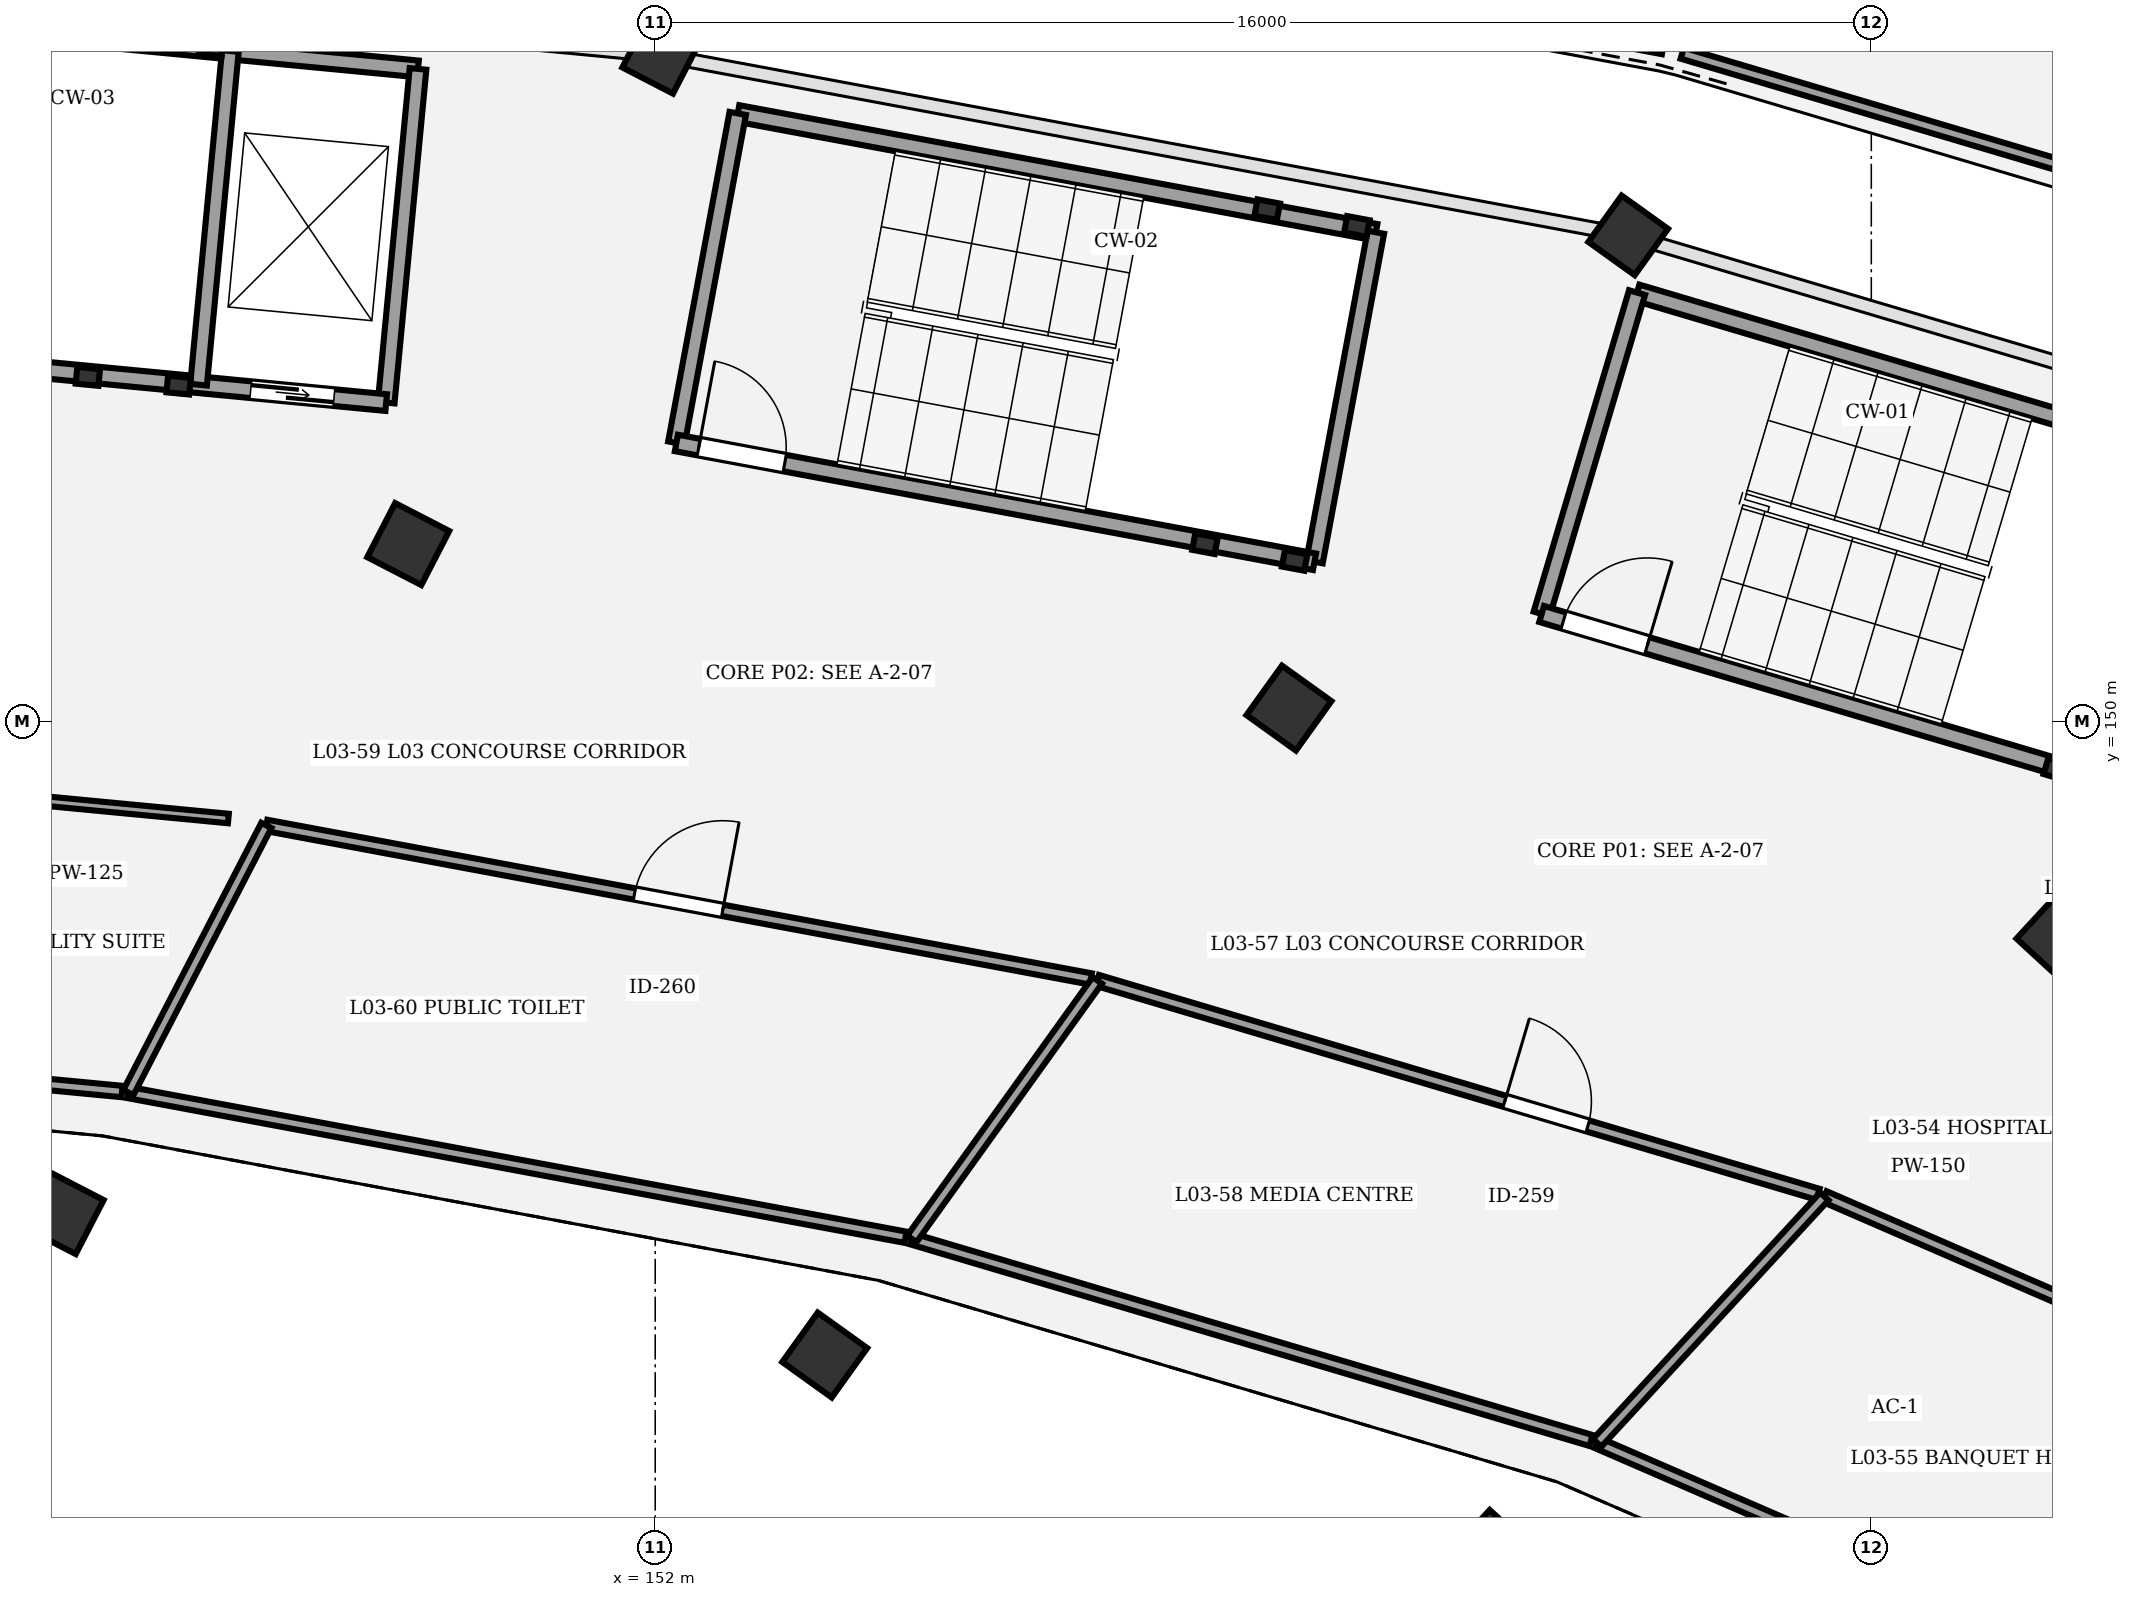
"""IFC4 building model, lengths in metres.
Left out: names, types, materials, properties, quantities, classifications, styles, units other than length and angle.
Written with IfcOpenShell. Run it as: python <this file> out.ifc"""

import sys

from ifc_helpers import new_model, si_unit, direction, frame, frame_2d, origin, origin_2d, place, context, subcontext, project, spatial, rectangle, extrude, element, fill, save


model = new_model("IFC4")
c1 = context("Model", 3, precision=1e-05, world=origin(), true_north=direction((0.0, 1.0)))
c2 = subcontext(c1, "Body", "Model", "MODEL_VIEW")
j1 = project(units=[si_unit("LENGTHUNIT", "METRE"), si_unit("PLANEANGLEUNIT", "RADIAN")], contexts=[c1])
p1 = place(None, origin())
s1 = spatial("IfcSite", under=j1, at=p1, CompositionType="ELEMENT")
p2 = place(p1, origin())
s2 = spatial("IfcBuilding", under=s1, at=p2, CompositionType="ELEMENT")
p3 = place(p2, frame((0.0, 0.0, 14.7)))
s3 = spatial("IfcBuildingStorey", under=s2, at=p3, CompositionType="ELEMENT", Elevation=14.7)
p4 = place(p3, frame((163.003, 139.062, 0.0), z_axis=(0.0, 0.0, 1.0), x_axis=(0.677903094969, 0.735151272753, 0.0)))
e1 = element("IfcColumn", 1, at=p4, inside=s3, PredefinedType="COLUMN", context=c2, shape_type="SweptSolid", body=[
    extrude(rectangle(XDim=0.8, YDim=0.8, at=origin_2d()), origin(), (0.0, 0.0, 1.0), 2.85),
])
p5 = place(p3, frame((170.476, 147.168, 0.0), z_axis=(0.0, 0.0, 1.0), x_axis=(0.677903094969, 0.735151272753, 0.0)))
e2 = element("IfcColumn", 2, at=p5, inside=s3, PredefinedType="COLUMN", context=c2, shape_type="SweptSolid", body=[
    extrude(rectangle(XDim=0.8, YDim=0.8, at=origin_2d()), origin(), (0.0, 0.0, 1.0), 4.5),
])
p6 = place(p3, frame((154.23, 141.667, 0.0), z_axis=(0.0, 0.0, 1.0), x_axis=(0.582974127943, 0.812490717577, 0.0)))
e3 = element("IfcColumn", 3, at=p6, inside=s3, PredefinedType="COLUMN", context=c2, shape_type="SweptSolid", body=[
    extrude(rectangle(XDim=0.8, YDim=0.8, at=origin_2d()), origin(), (0.0, 0.0, 1.0), 2.85),
])
p7 = place(p3, frame((160.338, 150.177, 0.0), z_axis=(0.0, 0.0, 1.0), x_axis=(0.582974127943, 0.812490717577, 0.0)))
e4 = element("IfcColumn", 4, at=p7, inside=s3, PredefinedType="COLUMN", context=c2, shape_type="SweptSolid", body=[
    extrude(rectangle(XDim=0.8, YDim=0.8, at=origin_2d()), origin(), (0.0, 0.0, 1.0), 4.5),
])
p8 = place(p3, frame((164.801, 156.397, 0.0), z_axis=(0.0, 0.0, 1.0), x_axis=(0.582974127943, 0.812490717577, 0.0)))
e5 = element("IfcColumn", 5, at=p8, inside=s3, PredefinedType="COLUMN", context=c2, shape_type="SweptSolid", body=[
    extrude(rectangle(XDim=0.75, YDim=0.75, at=origin_2d()), origin(), (0.0, 0.0, 1.0), 4.5),
])
p9 = place(p3, frame((144.204, 143.534, 0.0), z_axis=(0.0, 0.0, 1.0), x_axis=(0.458959712465, 0.888457079624, 0.0)))
e6 = element("IfcColumn", 6, at=p9, inside=s3, PredefinedType="COLUMN", context=c2, shape_type="SweptSolid", body=[
    extrude(rectangle(XDim=0.8, YDim=0.8, at=origin_2d()), origin(), (0.0, 0.0, 1.0), 2.85),
])
p10 = place(p3, frame((148.75, 152.335, 0.0), z_axis=(0.0, 0.0, 1.0), x_axis=(0.458959712465, 0.888457079624, 0.0)))
e7 = element("IfcColumn", 7, at=p10, inside=s3, PredefinedType="COLUMN", context=c2, shape_type="SweptSolid", body=[
    extrude(rectangle(XDim=0.8, YDim=0.8, at=origin_2d()), origin(), (0.0, 0.0, 1.0), 4.5),
])
p11 = place(p3, frame((152.073, 158.767, 0.0), z_axis=(0.0, 0.0, 1.0), x_axis=(0.458959712465, 0.888457079624, 0.0)))
e8 = element("IfcColumn", 8, at=p11, inside=s3, PredefinedType="COLUMN", context=c2, shape_type="SweptSolid", body=[
    extrude(rectangle(XDim=0.75, YDim=0.75, at=origin_2d()), origin(), (0.0, 0.0, 1.0), 4.5),
])
for number, where, z_axis, x_axis in (
    (9, (144.535, 154.541, 0.0), (0.0, 0.0, 1.0), (0.995, -0.095, 0.0)),
    (10, (145.73, 154.427, 0.0), (0.0, 0.0, 1.0), (0.995, -0.095, 0.0)),
    (11, (146.154, 158.877, 0.0), (0.0, 0.0, 1.0), (0.995, -0.095, 0.0)),
):
    element("IfcColumn", number, at=place(p3, frame(where, z_axis=z_axis, x_axis=x_axis)), inside=s3, PredefinedType="COLUMN", context=c2, shape_type="SweptSolid", body=[
        extrude(rectangle(XDim=0.3, YDim=0.22, at=origin_2d()), origin(), (0.0, 0.0, 1.0), 4.5),
    ])
p12 = place(p3, frame((137.909, 159.634, 0.0), z_axis=(0.0, 0.0, 1.0), x_axis=(0.99547962713, -0.094975322952, 0.0)))
e12 = element("IfcWall", 12, at=p12, inside=s3, PredefinedType="SHEAR", context=c2, shape_type="SweptSolid", body=[
    extrude(rectangle(XDim=11.02, YDim=0.22, at=frame_2d((5.51, 0.0))), origin(), (0.0, 0.0, 1.0), 4.25),
])
p13 = place(p3, frame((148.46, 154.197, 0.0), z_axis=(0.0, 0.0, 1.0), x_axis=(0.095002424918, 0.995477041051, 0.0)))
e13 = element("IfcWall", 13, at=p13, inside=s3, PredefinedType="SHEAR", context=c2, shape_type="SweptSolid", body=[
    extrude(rectangle(XDim=4.41, YDim=0.22, at=frame_2d((2.205, 0.0))), origin(), (0.0, 0.0, 1.0), 4.25),
])
p14 = place(p3, frame((137.49, 155.243, 0.0), z_axis=(0.0, 0.0, 1.0), x_axis=(0.995481721489, -0.094953368458, 0.0)))
e14 = element("IfcWall", 14, at=p14, inside=s3, PredefinedType="SHEAR", context=c2, shape_type="SweptSolid", body=[
    extrude(rectangle(XDim=11.02, YDim=0.22, at=frame_2d((5.51, 0.0))), origin(), (0.0, 0.0, 1.0), 4.25),
])
p15 = place(p14, frame((0.3, 0.0, 0.0)))
e15 = element("IfcOpeningElement", 15, at=p15, cuts=e14, PredefinedType="OPENING", context=c2, shape_type="SweptSolid", body=[
    extrude(rectangle(XDim=1.15, YDim=2.15, at=frame_2d((0.575, 1.075))), frame((0.0, 0.12, 0.0), z_axis=(0.0, -1.0, 0.0), x_axis=(1.0, 0.0, 0.0)), (0.0, 0.0, 1.0), 0.24),
])
p16 = place(p14, frame((9.23, 0.0, 0.0)))
e16 = element("IfcOpeningElement", 16, at=p16, cuts=e14, PredefinedType="OPENING", context=c2, shape_type="SweptSolid", body=[
    extrude(rectangle(XDim=1.1, YDim=2.15, at=frame_2d((0.55, 1.075))), frame((0.0, 0.12, 0.0), z_axis=(0.0, -1.0, 0.0), x_axis=(1.0, 0.0, 0.0)), (0.0, 0.0, 1.0), 0.24),
])
p17 = place(p3, frame((145.991, 154.432, 0.0), z_axis=(0.0, 0.0, 1.0), x_axis=(0.094997189401, 0.995477540684, 0.0)))
e17 = element("IfcWall", 17, at=p17, inside=s3, PredefinedType="SHEAR", context=c2, shape_type="SweptSolid", body=[
    extrude(rectangle(XDim=4.41, YDim=0.22, at=frame_2d((2.205, 0.0))), origin(), (0.0, 0.0, 1.0), 4.25),
])
p18 = place(p3, frame((170.442, 149.373, 0.0), z_axis=(0.0, 0.0, 1.0), x_axis=(0.958670893355, -0.284517342588, 0.0)))
e18 = element("IfcColumn", 18, at=p18, inside=s3, PredefinedType="COLUMN", context=c2, shape_type="SweptSolid", body=[
    extrude(rectangle(XDim=0.3, YDim=0.22, at=origin_2d()), origin(), (0.0, 0.0, 1.0), 4.5),
])
p19 = place(p3, frame((164.918, 155.644, 0.0), z_axis=(0.0, 0.0, 1.0), x_axis=(0.958675743706, -0.284500998997, 0.0)))
e19 = element("IfcWall", 19, at=p19, inside=s3, PredefinedType="SHEAR", context=c2, shape_type="SweptSolid", body=[
    extrude(rectangle(XDim=8.54, YDim=0.22, at=frame_2d((4.27, 0.0))), origin(), (0.0, 0.0, 1.0), 4.25),
])
p20 = place(p3, frame((163.663, 151.416, 0.0), z_axis=(0.0, 0.0, 1.0), x_axis=(0.284497328872, 0.958676832861, 0.0)))
e20 = element("IfcWall", 20, at=p20, inside=s3, PredefinedType="SHEAR", context=c2, shape_type="SweptSolid", body=[
    extrude(rectangle(XDim=4.41, YDim=0.22, at=frame_2d((2.205, 0.0))), origin(), (0.0, 0.0, 1.0), 4.25),
])
p21 = place(p3, frame((163.663, 151.416, 0.0), z_axis=(0.0, 0.0, 1.0), x_axis=(0.958665631999, -0.284535069937, 0.0)))
e21 = element("IfcWall", 21, at=p21, inside=s3, PredefinedType="SHEAR", context=c2, shape_type="SweptSolid", body=[
    extrude(rectangle(XDim=8.54, YDim=0.22, at=frame_2d((4.27, 0.0))), origin(), (0.0, 0.0, 1.0), 4.25),
])
p22 = place(p21, frame((0.3, 0.0, 0.0)))
e22 = element("IfcOpeningElement", 22, at=p22, cuts=e21, PredefinedType="OPENING", context=c2, shape_type="SweptSolid", body=[
    extrude(rectangle(XDim=1.15, YDim=2.15, at=frame_2d((0.575, 1.075))), frame((0.0, 0.12, 0.0), z_axis=(0.0, -1.0, 0.0), x_axis=(1.0, 0.0, 0.0)), (0.0, 0.0, 1.0), 0.24),
])
for number, where, z_axis, x_axis in (
    (23, (159.233, 152.34, 0.0), (0.0, 0.0, 1.0), (0.983, -0.183, 0.0)),
    (24, (160.413, 152.121, 0.0), (0.0, 0.0, 1.0), (0.983, -0.183, 0.0)),
    (25, (161.231, 156.515, 0.0), (0.0, 0.0, 1.0), (0.983, -0.183, 0.0)),
    (26, (160.052, 156.735, 0.0), (0.0, 0.0, 1.0), (0.983, -0.183, 0.0)),
):
    element("IfcColumn", number, at=place(p3, frame(where, z_axis=z_axis, x_axis=x_axis)), inside=s3, PredefinedType="COLUMN", context=c2, shape_type="SweptSolid", body=[
        extrude(rectangle(XDim=0.3, YDim=0.22, at=origin_2d()), origin(), (0.0, 0.0, 1.0), 4.5),
    ])
p23 = place(p3, frame((153.086, 158.001, 0.0), z_axis=(0.0, 0.0, 1.0), x_axis=(0.983097993869, -0.18308013123, 0.0)))
e27 = element("IfcWall", 27, at=p23, inside=s3, PredefinedType="SHEAR", context=c2, shape_type="SweptSolid", body=[
    extrude(rectangle(XDim=8.54, YDim=0.22, at=frame_2d((4.27, 0.0))), origin(), (0.0, 0.0, 1.0), 4.25),
])
for number, where, z_axis, x_axis in (
    (28, (152.279, 153.666, 0.0), (0.0, 0.0, 1.0), (0.183, 0.983, 0.0)),
    (29, (160.674, 152.103, 0.0), (0.0, 0.0, 1.0), (0.183, 0.983, 0.0)),
):
    element("IfcWall", number, at=place(p3, frame(where, z_axis=z_axis, x_axis=x_axis)), inside=s3, PredefinedType="SHEAR", context=c2, shape_type="SweptSolid", body=[
        extrude(rectangle(XDim=4.41, YDim=0.22, at=frame_2d((2.205, 0.0))), origin(), (0.0, 0.0, 1.0), 4.25),
    ])
p24 = place(p3, frame((152.279, 153.666, 0.0), z_axis=(0.0, 0.0, 1.0), x_axis=(0.983097993869, -0.18308013123, 0.0)))
e30 = element("IfcWall", 30, at=p24, inside=s3, PredefinedType="SHEAR", context=c2, shape_type="SweptSolid", body=[
    extrude(rectangle(XDim=8.54, YDim=0.22, at=frame_2d((4.27, 0.0))), origin(), (0.0, 0.0, 1.0), 4.25),
])
p25 = place(p24, frame((0.3, 0.0, 0.0)))
e31 = element("IfcOpeningElement", 31, at=p25, cuts=e30, PredefinedType="OPENING", context=c2, shape_type="SweptSolid", body=[
    extrude(rectangle(XDim=1.15, YDim=2.15, at=frame_2d((0.575, 1.075))), frame((0.0, 0.12, 0.0), z_axis=(0.0, -1.0, 0.0), x_axis=(1.0, 0.0, 0.0)), (0.0, 0.0, 1.0), 0.24),
])
p26 = place(p3, frame((167.382, 143.753, 0.0), z_axis=(0.0, 0.0, 1.0), x_axis=(0.917494590455, -0.397748257677, 0.0)))
e32 = element("IfcWall", 32, at=p26, inside=s3, PredefinedType="PARTITIONING", context=c2, shape_type="SweptSolid", body=[
    extrude(rectangle(XDim=9.049, YDim=0.15, at=frame_2d((4.525, 0.0))), origin(), (0.0, 0.0, 1.0), 3.25),
])
p27 = place(p26, frame((6.199, 0.0, 0.0)))
e33 = element("IfcOpeningElement", 33, at=p27, cuts=e32, PredefinedType="OPENING", context=c2, shape_type="SweptSolid", body=[
    extrude(rectangle(XDim=1.06, YDim=2.1, at=frame_2d((0.53, 1.05))), frame((0.0, 0.085, 0.0), z_axis=(0.0, -1.0, 0.0), x_axis=(1.0, 0.0, 0.0)), (0.0, 0.0, 1.0), 0.17),
])
p28 = place(p3, frame((157.817, 146.596, 0.0), z_axis=(0.0, 0.0, 1.0), x_axis=(0.958655809656, -0.284568161629, 0.0)))
e34 = element("IfcWall", 34, at=p28, inside=s3, PredefinedType="PARTITIONING", context=c2, shape_type="SweptSolid", body=[
    extrude(rectangle(XDim=9.891, YDim=0.15, at=frame_2d((4.946, 0.0))), origin(), (0.0, 0.0, 1.0), 3.25),
])
p29 = place(p28, frame((5.592, 0.0, 0.0)))
e35 = element("IfcOpeningElement", 35, at=p29, cuts=e34, PredefinedType="OPENING", context=c2, shape_type="SweptSolid", body=[
    extrude(rectangle(XDim=1.14, YDim=2.1, at=frame_2d((0.57, 1.05))), frame((0.0, 0.085, 0.0), z_axis=(0.0, -1.0, 0.0), x_axis=(1.0, 0.0, 0.0)), (0.0, 0.0, 1.0), 0.17),
])
p30 = place(p3, frame((146.884, 148.635, 0.0), z_axis=(0.0, 0.0, 1.0), x_axis=(0.983097372707, -0.183083466695, 0.0)))
e36 = element("IfcWall", 36, at=p30, inside=s3, PredefinedType="PARTITIONING", context=c2, shape_type="SweptSolid", body=[
    extrude(rectangle(XDim=11.035, YDim=0.15, at=frame_2d((5.517, 0.0))), origin(), (0.0, 0.0, 1.0), 3.25),
])
p31 = place(p30, frame((4.927, 0.0, 0.0)))
e37 = element("IfcOpeningElement", 37, at=p31, cuts=e36, PredefinedType="OPENING", context=c2, shape_type="SweptSolid", body=[
    extrude(rectangle(XDim=1.18, YDim=2.1, at=frame_2d((0.59, 1.05))), frame((0.0, 0.085, 0.0), z_axis=(0.0, -1.0, 0.0), x_axis=(1.0, 0.0, 0.0)), (0.0, 0.0, 1.0), 0.17),
])
p32 = place(p3, frame((146.384, 148.725, 0.0), z_axis=(0.0, 0.0, 1.0), x_axis=(-0.995487942551, 0.094888124843, 0.0)))
e38 = element("IfcWall", 38, at=p32, inside=s3, PredefinedType="PARTITIONING", context=c2, shape_type="SweptSolid", body=[
    extrude(rectangle(XDim=5.977, YDim=0.125, at=frame_2d((2.988, 0.0))), origin(), (0.0, 0.0, 1.0), 3.25),
])
p33 = place(p32, frame((4.231, 0.0, 0.0)))
e39 = element("IfcOpeningElement", 39, at=p33, cuts=e38, PredefinedType="OPENING", context=c2, shape_type="SweptSolid", body=[
    extrude(rectangle(XDim=1.22, YDim=2.1, at=frame_2d((0.61, 1.05))), frame((0.0, 0.073, 0.0), z_axis=(0.0, -1.0, 0.0), x_axis=(1.0, 0.0, 0.0)), (0.0, 0.0, 1.0), 0.145),
])
p34 = place(p3, frame((172.217, 137.119, 0.0), z_axis=(0.0, 0.0, 1.0), x_axis=(-0.917503740796, 0.397727149722, 0.0)))
e40 = element("IfcWall", 40, at=p34, inside=s3, PredefinedType="PARTITIONING", context=c2, shape_type="SweptSolid", body=[
    extrude(rectangle(XDim=8.527, YDim=0.15, at=frame_2d((4.264, 0.0))), origin(), (0.0, 0.0, 1.0), 3.25),
])
p35 = place(p3, frame((164.393, 140.511, 0.0), z_axis=(0.0, 0.0, 1.0), x_axis=(0.677850039095, 0.735200193484, 0.0)))
e41 = element("IfcWall", 41, at=p35, inside=s3, PredefinedType="PARTITIONING", context=c2, shape_type="SweptSolid", body=[
    extrude(rectangle(XDim=4.41, YDim=0.15, at=frame_2d((2.205, 0.0))), origin(), (0.0, 0.0, 1.0), 3.25),
])
p36 = place(p3, frame((164.312, 140.542, 0.0), z_axis=(0.0, 0.0, 1.0), x_axis=(-0.958657695612, 0.284561808126, 0.0)))
e42 = element("IfcWall", 42, at=p36, inside=s3, PredefinedType="PARTITIONING", context=c2, shape_type="SweptSolid", body=[
    extrude(rectangle(XDim=9.322, YDim=0.15, at=frame_2d((4.661, 0.0))), origin(), (0.0, 0.0, 1.0), 3.25),
])
p37 = place(p3, frame((155.376, 143.195, 0.0), z_axis=(0.0, 0.0, 1.0), x_axis=(0.582985720231, 0.812482399814, 0.0)))
e43 = element("IfcWall", 43, at=p37, inside=s3, PredefinedType="PARTITIONING", context=c2, shape_type="SweptSolid", body=[
    extrude(rectangle(XDim=4.186, YDim=0.15, at=frame_2d((2.093, 0.0))), origin(), (0.0, 0.0, 1.0), 3.25),
])
p38 = place(p3, frame((155.293, 143.216, 0.0), z_axis=(0.0, 0.0, 1.0), x_axis=(-0.983096264982, 0.183089414709, 0.0)))
e44 = element("IfcWall", 44, at=p38, inside=s3, PredefinedType="PARTITIONING", context=c2, shape_type="SweptSolid", body=[
    extrude(rectangle(XDim=10.401, YDim=0.15, at=frame_2d((5.2, 0.0))), origin(), (0.0, 0.0, 1.0), 3.25),
])
p39 = place(p3, frame((145.068, 145.121, 0.0), z_axis=(0.0, 0.0, 1.0), x_axis=(0.459001375355, 0.888435556145, 0.0)))
e45 = element("IfcWall", 45, at=p39, inside=s3, PredefinedType="PARTITIONING", context=c2, shape_type="SweptSolid", body=[
    extrude(rectangle(XDim=3.955, YDim=0.15, at=frame_2d((1.978, 0.0))), origin(), (0.0, 0.0, 1.0), 3.25),
])
p40 = place(p3, frame((144.985, 145.133, 0.0), z_axis=(0.0, 0.0, 1.0), x_axis=(-0.995484271109, 0.094926634693, 0.0)))
e46 = element("IfcWall", 46, at=p40, inside=s3, PredefinedType="PARTITIONING", context=c2, shape_type="SweptSolid", body=[
    extrude(rectangle(XDim=4.411, YDim=0.15, at=frame_2d((2.206, 0.0))), origin(), (0.0, 0.0, 1.0), 3.25),
])
p41 = place(p3, frame((173.64, 156.381, 0.0), z_axis=(0.0, 0.0, 1.0), x_axis=(-0.95866000112, 0.284554041006, 0.0)))
e47 = element("IfcWall", 47, at=p41, inside=s3, PredefinedType="PARTITIONING", context=c2, shape_type="SweptSolid", body=[
    extrude(rectangle(XDim=8.478, YDim=0.15, at=frame_2d((4.239, 0.0))), origin(), (0.0, 0.0, 1.0), 3.25),
])
p42 = place(p3, frame((165.259, 158.854, 0.0), z_axis=(0.0, 0.0, 1.0), x_axis=(-0.983091639371, 0.183114250127, 0.0)))
e48 = element("IfcWall", 48, at=p42, inside=s3, PredefinedType="PARTITIONING", context=c2, shape_type="SweptSolid", body=[
    extrude(rectangle(XDim=11.223, YDim=0.15, at=frame_2d((5.612, 0.0))), origin(), (0.0, 0.0, 1.0), 3.25),
])
p43 = place(p16, origin())
e49 = element("IfcDoor", 49, at=p43, inside=s3, OperationType="DOUBLE_DOOR_SLIDING", PredefinedType="DOOR", context=c2, shape_type="SweptSolid", body=[
    extrude(rectangle(XDim=1.1, YDim=2.15, at=frame_2d((0.55, 1.075))), frame((0.0, 0.025, 0.0), z_axis=(0.0, -1.0, 0.0), x_axis=(1.0, 0.0, 0.0)), (0.0, 0.0, 1.0), 0.05),
])
fill(e16, e49)
p44 = place(p22, origin())
e50 = element("IfcDoor", 50, at=p44, inside=s3, OperationType="SINGLE_SWING_RIGHT", PredefinedType="DOOR", context=c2, shape_type="SweptSolid", body=[
    extrude(rectangle(XDim=1.15, YDim=2.15, at=frame_2d((0.575, 1.075))), frame((0.0, 0.025, 0.0), z_axis=(0.0, -1.0, 0.0), x_axis=(1.0, 0.0, 0.0)), (0.0, 0.0, 1.0), 0.05),
])
fill(e22, e50)
p45 = place(p25, origin())
e51 = element("IfcDoor", 51, at=p45, inside=s3, OperationType="SINGLE_SWING_LEFT", PredefinedType="DOOR", context=c2, shape_type="SweptSolid", body=[
    extrude(rectangle(XDim=1.15, YDim=2.15, at=frame_2d((0.575, 1.075))), frame((0.0, 0.025, 0.0), z_axis=(0.0, -1.0, 0.0), x_axis=(1.0, 0.0, 0.0)), (0.0, 0.0, 1.0), 0.05),
])
fill(e31, e51)
p46 = place(p29, origin())
e52 = element("IfcDoor", 52, at=p46, inside=s3, OperationType="SINGLE_SWING_LEFT", PredefinedType="DOOR", context=c2, shape_type="SweptSolid", body=[
    extrude(rectangle(XDim=1.14, YDim=2.1, at=frame_2d((0.57, 1.05))), frame((0.0, 0.025, 0.0), z_axis=(0.0, -1.0, 0.0), x_axis=(1.0, 0.0, 0.0)), (0.0, 0.0, 1.0), 0.05),
])
fill(e35, e52)
p47 = place(p31, origin())
e53 = element("IfcDoor", 53, at=p47, inside=s3, OperationType="SINGLE_SWING_RIGHT", PredefinedType="DOOR", context=c2, shape_type="SweptSolid", body=[
    extrude(rectangle(XDim=1.18, YDim=2.1, at=frame_2d((0.59, 1.05))), frame((0.0, 0.025, 0.0), z_axis=(0.0, -1.0, 0.0), x_axis=(1.0, 0.0, 0.0)), (0.0, 0.0, 1.0), 0.05),
])
fill(e37, e53)
save(model, sys.argv[1])
